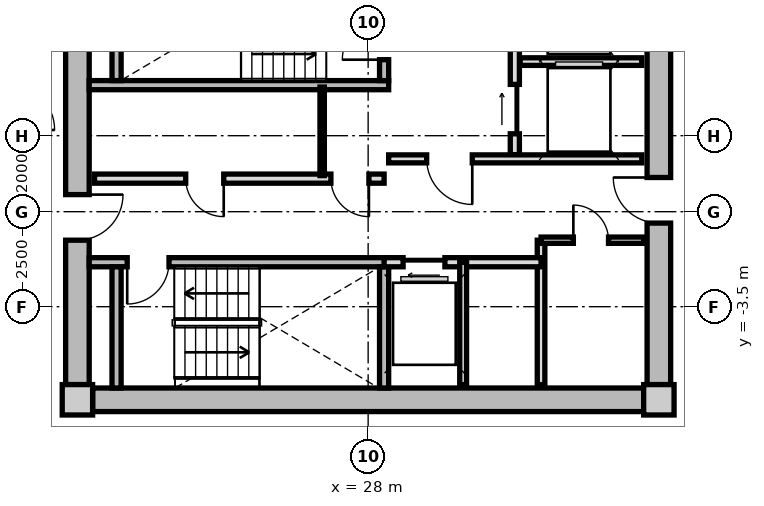
"""IFC4 building model, lengths in metres.
Left out: names, types, materials, properties, quantities, classifications, styles, units other than length and angle.
Written with IfcOpenShell. Run it as: python <this file> out.ifc"""

import sys

from ifc_helpers import new_model, si_unit, direction, frame, frame_2d, origin, origin_2d, place, context, subcontext, project, spatial, rectangle, extrude, source, transform, mapped, element, fill, save


model = new_model("IFC4")
c1 = context("Model", 3, precision=1e-05, world=origin(), true_north=direction((0.0, 1.0)))
c2 = subcontext(c1, "Body", "Model", "MODEL_VIEW")
j1 = project(units=[si_unit("LENGTHUNIT", "METRE"), si_unit("PLANEANGLEUNIT", "RADIAN")], contexts=[c1])
p1 = place(None, origin())
s1 = spatial("IfcSite", under=j1, at=p1, CompositionType="ELEMENT")
p2 = place(p1, origin())
s2 = spatial("IfcBuilding", under=s1, at=p2, CompositionType="ELEMENT")
p3 = place(p2, frame((0.0, 0.0, 137.35)))
s3 = spatial("IfcBuildingStorey", under=s2, at=p3, CompositionType="ELEMENT", Elevation=137.35)
m1 = source(origin(), c2, "Body", "SweptSolid", [
    extrude(rectangle(XDim=0.8, YDim=0.8, at=origin_2d()), origin(), (0.0, 0.0, 1.0), 3.05),
])
for number, where, z_axis, x_axis in (
    (1, (20.35, -5.95, 0.0), (0.0, 0.0, 1.0), (1.0, 0.0, 0.0)),
    (2, (35.65, -5.95, 0.0), (0.0, 0.0, 1.0), (1.0, 0.0, 0.0)),
):
    element("IfcColumn", number, at=place(p3, frame(where, z_axis=z_axis, x_axis=x_axis)), inside=s3, PredefinedType="COLUMN", context=c2, shape_type="MappedRepresentation", body=[
        mapped(m1, transform((0.0, 0.0, 0.0), x_axis=(1.0, 0.0, 0.0), y_axis=(0.0, 1.0, 0.0), z_axis=(0.0, 0.0, 1.0), scale=1.0)),
    ])
m2 = source(origin(), c2, "Body", "SweptSolid", [
    extrude(rectangle(XDim=14.5, YDim=0.62, at=frame_2d((7.25, 0.0))), origin(), (0.0, 0.0, 1.0), 2.81),
])
p4 = place(p3, frame((35.25, -5.95, 0.0), z_axis=(0.0, 0.0, 1.0), x_axis=(-1.0, 0.0, 0.0)))
e3 = element("IfcWall", 3, at=p4, inside=s3, PredefinedType="SHEAR", context=c2, shape_type="MappedRepresentation", body=[
    mapped(m2, transform((0.0, 0.0, 0.0), x_axis=(1.0, 0.0, 0.0), y_axis=(0.0, 1.0, 0.0), z_axis=(0.0, 0.0, 1.0), scale=1.0)),
])
m3 = source(origin(), c2, "Body", "SweptSolid", [
    extrude(rectangle(XDim=11.1, YDim=0.62, at=frame_2d((5.55, 0.0))), origin(), (0.0, 0.0, 1.0), 2.81),
])
p5 = place(p3, frame((20.35, -5.55, 0.0), z_axis=(0.0, 0.0, 1.0), x_axis=(0.0, 1.0, 0.0)))
e4 = element("IfcWall", 4, at=p5, inside=s3, PredefinedType="SHEAR", context=c2, shape_type="MappedRepresentation", body=[
    mapped(m3, transform((0.0, 0.0, 0.0), x_axis=(1.0, 0.0, 0.0), y_axis=(0.0, 1.0, 0.0), z_axis=(0.0, 0.0, 1.0), scale=1.0)),
])
p6 = place(p5, frame((3.8, 0.0, 0.0)))
e5 = element("IfcOpeningElement", 5, at=p6, cuts=e4, PredefinedType="OPENING", context=c2, shape_type="SweptSolid", body=[
    extrude(rectangle(XDim=1.2, YDim=2.15, at=frame_2d((0.6, 1.075))), frame((0.0, 0.32, 0.0), z_axis=(0.0, -1.0, 0.0), x_axis=(1.0, 0.0, 0.0)), (0.0, 0.0, 1.0), 0.64),
])
p7 = place(p3, frame((35.65, 5.55, 0.0), z_axis=(0.0, 0.0, 1.0), x_axis=(0.0, -1.0, 0.0)))
e6 = element("IfcWall", 6, at=p7, inside=s3, PredefinedType="SHEAR", context=c2, shape_type="MappedRepresentation", body=[
    mapped(m3, transform((0.0, 0.0, 0.0), x_axis=(1.0, 0.0, 0.0), y_axis=(0.0, 1.0, 0.0), z_axis=(0.0, 0.0, 1.0), scale=1.0)),
])
p8 = place(p7, frame((5.65, 0.0, 0.0)))
e7 = element("IfcOpeningElement", 7, at=p8, cuts=e6, PredefinedType="OPENING", context=c2, shape_type="SweptSolid", body=[
    extrude(rectangle(XDim=1.2, YDim=2.15, at=frame_2d((0.6, 1.075))), frame((0.0, 0.32, 0.0), z_axis=(0.0, -1.0, 0.0), x_axis=(1.0, 0.0, 0.0)), (0.0, 0.0, 1.0), 0.64),
])
m4 = source(origin(), c2, "Body", "SweptSolid", [
    extrude(rectangle(XDim=7.88, YDim=0.24, at=frame_2d((3.94, 0.0))), origin(), (0.0, 0.0, 1.0), 2.81),
])
p9 = place(p3, frame((20.66, 2.33, 0.0), z_axis=(0.0, 0.0, 1.0), x_axis=(1.0, 0.0, 0.0)))
e8 = element("IfcWall", 8, at=p9, inside=s3, PredefinedType="PARTITIONING", context=c2, shape_type="MappedRepresentation", body=[
    mapped(m4, transform((0.0, 0.0, 0.0), x_axis=(1.0, 0.0, 0.0), y_axis=(0.0, 1.0, 0.0), z_axis=(0.0, 0.0, 1.0), scale=1.0)),
])
m5 = source(origin(), c2, "Body", "SweptSolid", [
    extrude(rectangle(XDim=3.19, YDim=0.24, at=frame_2d((1.595, 0.0))), origin(), (0.0, 0.0, 1.0), 2.81),
])
p10 = place(p3, frame((21.38, 2.45, 0.0), z_axis=(0.0, 0.0, 1.0), x_axis=(0.0, 1.0, 0.0)))
e9 = element("IfcWall", 9, at=p10, inside=s3, PredefinedType="PARTITIONING", context=c2, shape_type="MappedRepresentation", body=[
    mapped(m5, transform((0.0, 0.0, 0.0), x_axis=(1.0, 0.0, 0.0), y_axis=(0.0, 1.0, 0.0), z_axis=(0.0, 0.0, 1.0), scale=1.0)),
])
p11 = place(p3, frame((28.42, 2.45, 0.0), z_axis=(0.0, 0.0, 1.0), x_axis=(0.0, 1.0, 0.0)))
e10 = element("IfcWall", 10, at=p11, inside=s3, PredefinedType="PARTITIONING", context=c2, shape_type="MappedRepresentation", body=[
    mapped(m5, transform((0.0, 0.0, 0.0), x_axis=(1.0, 0.0, 0.0), y_axis=(0.0, 1.0, 0.0), z_axis=(0.0, 0.0, 1.0), scale=1.0)),
])
p12 = place(p11, frame((0.55, 0.0, 0.0)))
e11 = element("IfcOpeningElement", 11, at=p12, cuts=e10, PredefinedType="OPENING", context=c2, shape_type="SweptSolid", body=[
    extrude(rectangle(XDim=1.1, YDim=2.15, at=frame_2d((0.55, 1.075))), frame((0.0, 0.13, 0.0), z_axis=(0.0, -1.0, 0.0), x_axis=(1.0, 0.0, 0.0)), (0.0, 0.0, 1.0), 0.26),
])
p13 = place(p3, frame((20.66, -2.33, 0.0), z_axis=(0.0, 0.0, 1.0), x_axis=(1.0, 0.0, 0.0)))
e12 = element("IfcWall", 12, at=p13, inside=s3, PredefinedType="PARTITIONING", context=c2, shape_type="MappedRepresentation", body=[
    mapped(m4, transform((0.0, 0.0, 0.0), x_axis=(1.0, 0.0, 0.0), y_axis=(0.0, 1.0, 0.0), z_axis=(0.0, 0.0, 1.0), scale=1.0)),
])
p14 = place(p13, frame((1.0, 0.0, 0.0)))
e13 = element("IfcOpeningElement", 13, at=p14, cuts=e12, PredefinedType="OPENING", context=c2, shape_type="SweptSolid", body=[
    extrude(rectangle(XDim=1.1, YDim=2.15, at=frame_2d((0.55, 1.075))), frame((0.0, 0.13, 0.0), z_axis=(0.0, -1.0, 0.0), x_axis=(1.0, 0.0, 0.0)), (0.0, 0.0, 1.0), 0.26),
])
for number, where, z_axis, x_axis in (
    (14, (21.38, -5.64, 0.0), (0.0, 0.0, 1.0), (0.0, 1.0, 0.0)),
    (15, (28.42, -5.64, 0.0), (0.0, 0.0, 1.0), (0.0, 1.0, 0.0)),
):
    element("IfcWall", number, at=place(p3, frame(where, z_axis=z_axis, x_axis=x_axis)), inside=s3, PredefinedType="PARTITIONING", context=c2, shape_type="MappedRepresentation", body=[
        mapped(m5, transform((0.0, 0.0, 0.0), x_axis=(1.0, 0.0, 0.0), y_axis=(0.0, 1.0, 0.0), z_axis=(0.0, 0.0, 1.0), scale=1.0)),
    ])
m6 = source(origin(), c2, "Body", "SweptSolid", [
    extrude(rectangle(XDim=5.0, YDim=0.24, at=frame_2d((2.5, 0.0))), origin(), (0.0, 0.0, 1.0), 2.795),
])
p15 = place(p3, frame((31.86, 0.5, 0.0), z_axis=(0.0, 0.0, 1.0), x_axis=(0.0, 1.0, 0.0)))
e16 = element("IfcWall", 16, at=p15, inside=s3, PredefinedType="PARTITIONING", context=c2, shape_type="MappedRepresentation", body=[
    mapped(m6, transform((0.0, 0.0, 0.0), x_axis=(1.0, 0.0, 0.0), y_axis=(0.0, 1.0, 0.0), z_axis=(0.0, 0.0, 1.0), scale=1.0)),
])
p16 = place(p15, frame((3.05, 0.0, 0.0)))
e17 = element("IfcOpeningElement", 17, at=p16, cuts=e16, PredefinedType="OPENING", context=c2, shape_type="SweptSolid", body=[
    extrude(rectangle(XDim=1.3, YDim=2.2, at=frame_2d((0.65, 1.1))), frame((0.0, 0.13, 0.0), z_axis=(0.0, -1.0, 0.0), x_axis=(1.0, 0.0, 0.0)), (0.0, 0.0, 1.0), 0.26),
])
p17 = place(p15, frame((0.55, 0.0, 0.0)))
e18 = element("IfcOpeningElement", 18, at=p17, cuts=e16, PredefinedType="OPENING", context=c2, shape_type="SweptSolid", body=[
    extrude(rectangle(XDim=1.3, YDim=2.2, at=frame_2d((0.65, 1.1))), frame((0.0, 0.13, 0.0), z_axis=(0.0, -1.0, 0.0), x_axis=(1.0, 0.0, 0.0)), (0.0, 0.0, 1.0), 0.26),
])
m7 = source(origin(), c2, "Body", "SweptSolid", [
    extrude(rectangle(XDim=3.2, YDim=0.2, at=frame_2d((1.6, 0.0))), origin(), (0.0, 0.0, 1.0), 2.795),
])
p18 = place(p3, frame((32.0, 2.95, 0.0), z_axis=(0.0, 0.0, 1.0), x_axis=(1.0, 0.0, 0.0)))
e19 = element("IfcWall", 19, at=p18, inside=s3, PredefinedType="PARTITIONING", context=c2, shape_type="MappedRepresentation", body=[
    mapped(m7, transform((0.0, 0.0, 0.0), x_axis=(1.0, 0.0, 0.0), y_axis=(0.0, 1.0, 0.0), z_axis=(0.0, 0.0, 1.0), scale=1.0)),
])
m8 = source(origin(), c2, "Body", "SweptSolid", [
    extrude(rectangle(XDim=6.66, YDim=0.21, at=frame_2d((3.33, 0.0))), origin(), (0.0, 0.0, 1.0), 2.795),
])
p19 = place(p3, frame((28.54, 0.39, 0.0), z_axis=(0.0, 0.0, 1.0), x_axis=(1.0, 0.0, 0.0)))
e20 = element("IfcWall", 20, at=p19, inside=s3, PredefinedType="PARTITIONING", context=c2, shape_type="MappedRepresentation", body=[
    mapped(m8, transform((0.0, 0.0, 0.0), x_axis=(1.0, 0.0, 0.0), y_axis=(0.0, 1.0, 0.0), z_axis=(0.0, 0.0, 1.0), scale=1.0)),
])
p20 = place(p19, frame((1.0, 0.0, 0.0)))
e21 = element("IfcOpeningElement", 21, at=p20, cuts=e20, PredefinedType="OPENING", context=c2, shape_type="SweptSolid", body=[
    extrude(rectangle(XDim=1.2, YDim=2.15, at=frame_2d((0.6, 1.075))), frame((0.0, 0.115, 0.0), z_axis=(0.0, -1.0, 0.0), x_axis=(1.0, 0.0, 0.0)), (0.0, 0.0, 1.0), 0.23),
])
m9 = source(origin(), c2, "Body", "SweptSolid", [
    extrude(rectangle(XDim=7.62, YDim=0.24, at=frame_2d((3.81, 0.0))), origin(), (0.0, 0.0, 1.0), 2.795),
])
p21 = place(p3, frame((20.8, -0.13, 0.0), z_axis=(0.0, 0.0, 1.0), x_axis=(1.0, 0.0, 0.0)))
e22 = element("IfcWall", 22, at=p21, inside=s3, PredefinedType="PARTITIONING", context=c2, shape_type="MappedRepresentation", body=[
    mapped(m9, transform((0.0, 0.0, 0.0), x_axis=(1.0, 0.0, 0.0), y_axis=(0.0, 1.0, 0.0), z_axis=(0.0, 0.0, 1.0), scale=1.0)),
])
p22 = place(p21, frame((6.22, 0.0, 0.0)))
e23 = element("IfcOpeningElement", 23, at=p22, cuts=e22, PredefinedType="OPENING", context=c2, shape_type="SweptSolid", body=[
    extrude(rectangle(XDim=1.0, YDim=2.1, at=frame_2d((0.5, 1.05))), frame((0.0, 0.13, 0.0), z_axis=(0.0, -1.0, 0.0), x_axis=(1.0, 0.0, 0.0)), (0.0, 0.0, 1.0), 0.26),
])
p23 = place(p21, frame((2.4, 0.0, 0.0)))
e24 = element("IfcOpeningElement", 24, at=p23, cuts=e22, PredefinedType="OPENING", context=c2, shape_type="SweptSolid", body=[
    extrude(rectangle(XDim=1.0, YDim=2.1, at=frame_2d((0.5, 1.05))), frame((0.0, 0.13, 0.0), z_axis=(0.0, -1.0, 0.0), x_axis=(1.0, 0.0, 0.0)), (0.0, 0.0, 1.0), 0.26),
])
m10 = source(origin(), c2, "Body", "SweptSolid", [
    extrude(rectangle(XDim=2.33, YDim=0.115, at=frame_2d((1.165, 0.0))), origin(), (0.0, 0.0, 1.0), 2.795),
])
p24 = place(p3, frame((26.79, -0.05, 0.0), z_axis=(0.0, 0.0, 1.0), x_axis=(0.0, 1.0, 0.0)))
e25 = element("IfcWall", 25, at=p24, inside=s3, PredefinedType="PARTITIONING", context=c2, shape_type="MappedRepresentation", body=[
    mapped(m10, transform((0.0, 0.0, 0.0), x_axis=(1.0, 0.0, 0.0), y_axis=(0.0, 1.0, 0.0), z_axis=(0.0, 0.0, 1.0), scale=1.0)),
])
m11 = source(origin(), c2, "Body", "SweptSolid", [
    extrude(rectangle(XDim=3.8, YDim=0.2, at=frame_2d((1.9, 0.0))), origin(), (0.0, 0.0, 1.0), 2.795),
])
p25 = place(p3, frame((32.55, -5.55, 0.0), z_axis=(0.0, 0.0, 1.0), x_axis=(0.0, 1.0, 0.0)))
e26 = element("IfcWall", 26, at=p25, inside=s3, PredefinedType="PARTITIONING", context=c2, shape_type="MappedRepresentation", body=[
    mapped(m11, transform((0.0, 0.0, 0.0), x_axis=(1.0, 0.0, 0.0), y_axis=(0.0, 1.0, 0.0), z_axis=(0.0, 0.0, 1.0), scale=1.0)),
])
m12 = source(origin(), c2, "Body", "SweptSolid", [
    extrude(rectangle(XDim=4.13, YDim=0.24, at=frame_2d((2.065, 0.0))), origin(), (0.0, 0.0, 1.0), 2.795),
])
p26 = place(p3, frame((28.42, -2.33, 0.0), z_axis=(0.0, 0.0, 1.0), x_axis=(1.0, 0.0, 0.0)))
e27 = element("IfcWall", 27, at=p26, inside=s3, PredefinedType="PARTITIONING", context=c2, shape_type="MappedRepresentation", body=[
    mapped(m12, transform((0.0, 0.0, 0.0), x_axis=(1.0, 0.0, 0.0), y_axis=(0.0, 1.0, 0.0), z_axis=(0.0, 0.0, 1.0), scale=1.0)),
])
p27 = place(p26, frame((0.5, 0.0, 0.0)))
e28 = element("IfcOpeningElement", 28, at=p27, cuts=e27, PredefinedType="OPENING", context=c2, shape_type="SweptSolid", body=[
    extrude(rectangle(XDim=1.1, YDim=2.2, at=frame_2d((0.55, 1.1))), frame((0.0, 0.13, 0.0), z_axis=(0.0, -1.0, 0.0), x_axis=(1.0, 0.0, 0.0)), (0.0, 0.0, 1.0), 0.26),
])
m13 = source(origin(), c2, "Body", "SweptSolid", [
    extrude(rectangle(XDim=3.22, YDim=0.18, at=frame_2d((1.61, 0.0))), origin(), (0.0, 0.0, 1.0), 2.795),
])
p28 = place(p3, frame((30.5, -5.55, 0.0), z_axis=(0.0, 0.0, 1.0), x_axis=(0.0, 1.0, 0.0)))
e29 = element("IfcWall", 29, at=p28, inside=s3, PredefinedType="PARTITIONING", context=c2, shape_type="MappedRepresentation", body=[
    mapped(m13, transform((0.0, 0.0, 0.0), x_axis=(1.0, 0.0, 0.0), y_axis=(0.0, 1.0, 0.0), z_axis=(0.0, 0.0, 1.0), scale=1.0)),
])
m14 = source(origin(), c2, "Body", "SweptSolid", [
    extrude(rectangle(XDim=2.7, YDim=0.165, at=frame_2d((1.35, 0.0))), origin(), (0.0, 0.0, 1.0), 2.795),
])
p29 = place(p3, frame((32.55, -1.75, 0.0), z_axis=(0.0, 0.0, 1.0), x_axis=(1.0, 0.0, 0.0)))
e30 = element("IfcWall", 30, at=p29, inside=s3, PredefinedType="PARTITIONING", context=c2, shape_type="MappedRepresentation", body=[
    mapped(m14, transform((0.0, 0.0, 0.0), x_axis=(1.0, 0.0, 0.0), y_axis=(0.0, 1.0, 0.0), z_axis=(0.0, 0.0, 1.0), scale=1.0)),
])
p30 = place(p29, frame((0.85, 0.0, 0.0)))
e31 = element("IfcOpeningElement", 31, at=p30, cuts=e30, PredefinedType="OPENING", context=c2, shape_type="SweptSolid", body=[
    extrude(rectangle(XDim=0.925, YDim=2.1, at=frame_2d((0.462, 1.05))), frame((0.0, 0.093, 0.0), z_axis=(0.0, -1.0, 0.0), x_axis=(1.0, 0.0, 0.0)), (0.0, 0.0, 1.0), 0.185),
])
m15 = source(origin(), c2, "Body", "SweptSolid", [
    extrude(rectangle(XDim=1.1, YDim=2.15, at=frame_2d((0.55, 1.075))), frame((0.0, 0.025, 0.0), z_axis=(0.0, -1.0, 0.0), x_axis=(1.0, 0.0, 0.0)), (0.0, 0.0, 1.0), 0.05),
])
p31 = place(p12, origin())
e32 = element("IfcDoor", 32, at=p31, inside=s3, OperationType="SINGLE_SWING_LEFT", PredefinedType="DOOR", context=c2, shape_type="MappedRepresentation", body=[
    mapped(m15, transform((0.0, 0.0, 0.0), x_axis=(1.0, 0.0, 0.0), y_axis=(0.0, 1.0, 0.0), z_axis=(0.0, 0.0, 1.0), scale=1.0)),
])
fill(e11, e32)
p32 = place(p14, frame((1.1, 0.0, 0.0), z_axis=(0.0, 0.0, 1.0), x_axis=(-1.0, 0.0, 0.0)))
e33 = element("IfcDoor", 33, at=p32, inside=s3, OperationType="SINGLE_SWING_RIGHT", PredefinedType="DOOR", context=c2, shape_type="MappedRepresentation", body=[
    mapped(m15, transform((0.0, 0.0, 0.0), x_axis=(1.0, 0.0, 0.0), y_axis=(0.0, 1.0, 0.0), z_axis=(0.0, 0.0, 1.0), scale=1.0)),
])
fill(e13, e33)
m16 = source(origin(), c2, "Body", "SweptSolid", [
    extrude(rectangle(XDim=1.3, YDim=2.2, at=frame_2d((0.65, 1.1))), frame((0.0, 0.025, 0.0), z_axis=(0.0, -1.0, 0.0), x_axis=(1.0, 0.0, 0.0)), (0.0, 0.0, 1.0), 0.05),
])
p33 = place(p17, origin())
e34 = element("IfcDoor", 34, at=p33, inside=s3, OperationType="SLIDING_TO_RIGHT", PredefinedType="DOOR", context=c2, shape_type="MappedRepresentation", body=[
    mapped(m16, transform((0.0, 0.0, 0.0), x_axis=(1.0, 0.0, 0.0), y_axis=(0.0, 1.0, 0.0), z_axis=(0.0, 0.0, 1.0), scale=1.0)),
])
fill(e18, e34)
m17 = source(origin(), c2, "Body", "SweptSolid", [
    extrude(rectangle(XDim=1.2, YDim=2.15, at=frame_2d((0.6, 1.075))), frame((0.0, 0.025, 0.0), z_axis=(0.0, -1.0, 0.0), x_axis=(1.0, 0.0, 0.0)), (0.0, 0.0, 1.0), 0.05),
])
p34 = place(p20, frame((1.2, 0.0, 0.0), z_axis=(0.0, 0.0, 1.0), x_axis=(-1.0, 0.0, 0.0)))
e35 = element("IfcDoor", 35, at=p34, inside=s3, OperationType="SINGLE_SWING_LEFT", PredefinedType="DOOR", context=c2, shape_type="MappedRepresentation", body=[
    mapped(m17, transform((0.0, 0.0, 0.0), x_axis=(1.0, 0.0, 0.0), y_axis=(0.0, 1.0, 0.0), z_axis=(0.0, 0.0, 1.0), scale=1.0)),
])
fill(e21, e35)
p35 = place(p6, frame((1.2, 0.0, 0.0), z_axis=(0.0, 0.0, 1.0), x_axis=(-1.0, 0.0, 0.0)))
e36 = element("IfcDoor", 36, at=p35, inside=s3, OperationType="SINGLE_SWING_LEFT", PredefinedType="DOOR", context=c2, shape_type="MappedRepresentation", body=[
    mapped(m17, transform((0.0, 0.0, 0.0), x_axis=(1.0, 0.0, 0.0), y_axis=(0.0, 1.0, 0.0), z_axis=(0.0, 0.0, 1.0), scale=1.0)),
])
fill(e5, e36)
p36 = place(p8, frame((1.2, 0.0, 0.0), z_axis=(0.0, 0.0, 1.0), x_axis=(-1.0, 0.0, 0.0)))
e37 = element("IfcDoor", 37, at=p36, inside=s3, OperationType="SINGLE_SWING_RIGHT", PredefinedType="DOOR", context=c2, shape_type="MappedRepresentation", body=[
    mapped(m17, transform((0.0, 0.0, 0.0), x_axis=(1.0, 0.0, 0.0), y_axis=(0.0, 1.0, 0.0), z_axis=(0.0, 0.0, 1.0), scale=1.0)),
])
fill(e7, e37)
m18 = source(origin(), c2, "Body", "SweptSolid", [
    extrude(rectangle(XDim=1.0, YDim=2.1, at=frame_2d((0.5, 1.05))), frame((0.0, 0.025, 0.0), z_axis=(0.0, -1.0, 0.0), x_axis=(1.0, 0.0, 0.0)), (0.0, 0.0, 1.0), 0.05),
])
p37 = place(p22, frame((1.0, 0.0, 0.0), z_axis=(0.0, 0.0, 1.0), x_axis=(-1.0, 0.0, 0.0)))
e38 = element("IfcDoor", 38, at=p37, inside=s3, OperationType="SINGLE_SWING_LEFT", PredefinedType="DOOR", context=c2, shape_type="MappedRepresentation", body=[
    mapped(m18, transform((0.0, 0.0, 0.0), x_axis=(1.0, 0.0, 0.0), y_axis=(0.0, 1.0, 0.0), z_axis=(0.0, 0.0, 1.0), scale=1.0)),
])
fill(e23, e38)
p38 = place(p23, frame((1.0, 0.0, 0.0), z_axis=(0.0, 0.0, 1.0), x_axis=(-1.0, 0.0, 0.0)))
e39 = element("IfcDoor", 39, at=p38, inside=s3, OperationType="SINGLE_SWING_LEFT", PredefinedType="DOOR", context=c2, shape_type="MappedRepresentation", body=[
    mapped(m18, transform((0.0, 0.0, 0.0), x_axis=(1.0, 0.0, 0.0), y_axis=(0.0, 1.0, 0.0), z_axis=(0.0, 0.0, 1.0), scale=1.0)),
])
fill(e24, e39)
m19 = source(origin(), c2, "Body", "SweptSolid", [
    extrude(rectangle(XDim=1.1, YDim=2.2, at=frame_2d((0.55, 1.1))), frame((0.0, 0.025, 0.0), z_axis=(0.0, -1.0, 0.0), x_axis=(1.0, 0.0, 0.0)), (0.0, 0.0, 1.0), 0.05),
])
p39 = place(p27, frame((1.1, 0.0, 0.0), z_axis=(0.0, 0.0, 1.0), x_axis=(-1.0, 0.0, 0.0)))
e40 = element("IfcDoor", 40, at=p39, inside=s3, OperationType="SLIDING_TO_LEFT", PredefinedType="DOOR", context=c2, shape_type="MappedRepresentation", body=[
    mapped(m19, transform((0.0, 0.0, 0.0), x_axis=(1.0, 0.0, 0.0), y_axis=(0.0, 1.0, 0.0), z_axis=(0.0, 0.0, 1.0), scale=1.0)),
])
fill(e28, e40)
m20 = source(origin(), c2, "Body", "SweptSolid", [
    extrude(rectangle(XDim=0.925, YDim=2.1, at=frame_2d((0.462, 1.05))), frame((0.0, 0.025, 0.0), z_axis=(0.0, -1.0, 0.0), x_axis=(1.0, 0.0, 0.0)), (0.0, 0.0, 1.0), 0.05),
])
p40 = place(p30, origin())
e41 = element("IfcDoor", 41, at=p40, inside=s3, OperationType="SINGLE_SWING_LEFT", PredefinedType="DOOR", context=c2, shape_type="MappedRepresentation", body=[
    mapped(m20, transform((0.0, 0.0, 0.0), x_axis=(1.0, 0.0, 0.0), y_axis=(0.0, 1.0, 0.0), z_axis=(0.0, 0.0, 1.0), scale=1.0)),
])
fill(e31, e41)
save(model, sys.argv[1])
